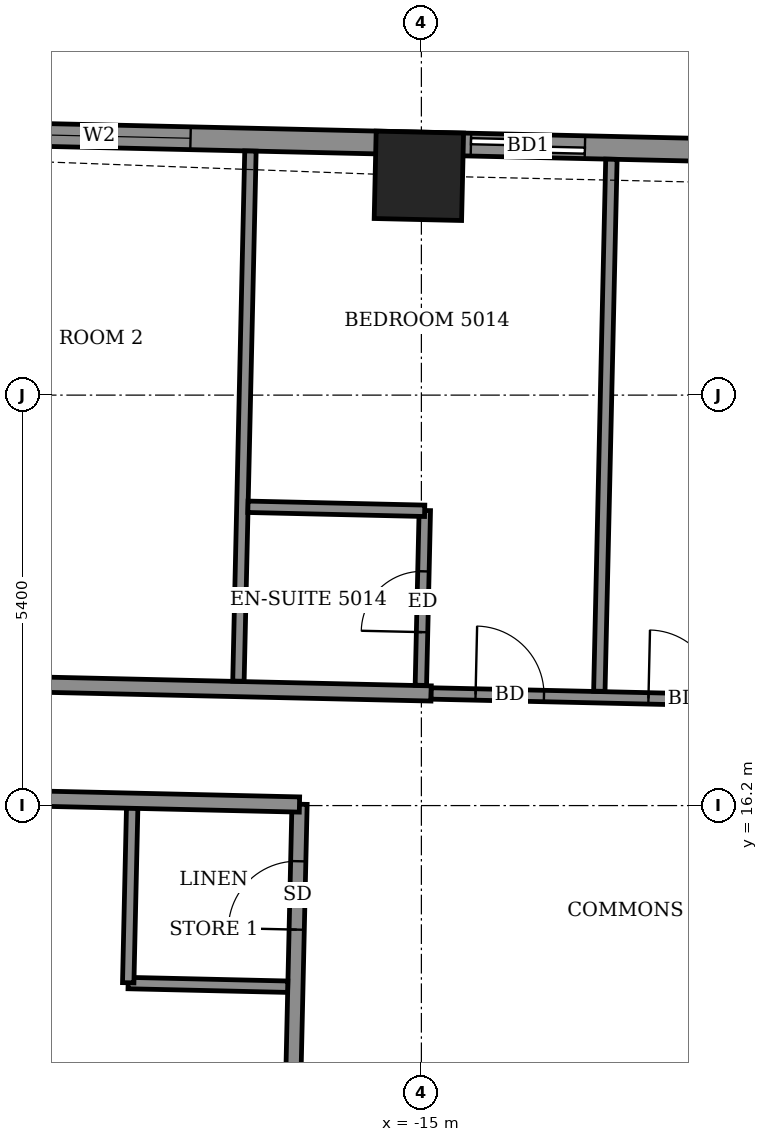
"""IFC4 building model, lengths in metres.
Left out: names, types, materials, properties, quantities, classifications, styles, units other than length and angle.
Written with IfcOpenShell. Run it as: python <this file> out.ifc"""

import sys

from ifc_helpers import new_model, si_unit, direction, frame, frame_2d, origin, origin_2d, place, context, subcontext, project, spatial, rectangle, extrude, element, fill, save


model = new_model("IFC4")
c1 = context("Model", 3, precision=1e-05, world=origin(), true_north=direction((0.0, 1.0)))
c2 = subcontext(c1, "Body", "Model", "MODEL_VIEW")
j1 = project(units=[si_unit("LENGTHUNIT", "METRE"), si_unit("PLANEANGLEUNIT", "RADIAN")], contexts=[c1])
p1 = place(None, origin())
s1 = spatial("IfcSite", under=j1, at=p1, CompositionType="ELEMENT")
p2 = place(p1, origin())
s2 = spatial("IfcBuilding", under=s1, at=p2, CompositionType="ELEMENT")
p3 = place(p2, frame((0.0, 0.0, 197.9)))
s3 = spatial("IfcBuildingStorey", under=s2, at=p3, CompositionType="ELEMENT", Elevation=197.9)
p4 = place(p3, frame((-15.033, 24.485, -0.55), z_axis=(0.0, 0.0, 1.0), x_axis=(-0.999742993665, 0.022670390785, 0.0)))
e1 = element("IfcColumn", 1, at=p4, inside=s3, PredefinedType="COLUMN", context=c2, shape_type="SweptSolid", body=[
    extrude(rectangle(XDim=1.15, YDim=1.15, at=origin_2d()), origin(), (0.0, 0.0, 1.0), 3.6),
])
p5 = place(p3, frame((20.437, 24.106, 0.0), z_axis=(0.0, 0.0, 1.0), x_axis=(-0.999742506232, 0.022691875925, 0.0)))
e2 = element("IfcWall", 2, at=p5, inside=s3, PredefinedType="SOLIDWALL", context=c2, shape_type="SweptSolid", body=[
    extrude(rectangle(XDim=42.444, YDim=0.3, at=frame_2d((21.222, 0.0))), origin(), (0.0, 0.0, 1.0), 3.05),
])
p6 = place(p5, frame((2.287, 0.0, 0.0)))
e3 = element("IfcOpeningElement", 3, at=p6, cuts=e2, PredefinedType="OPENING", context=c2, shape_type="SweptSolid", body=[
    extrude(rectangle(XDim=1.5, YDim=2.4, at=frame_2d((0.75, 1.2))), frame((0.0, 0.16, 0.0), z_axis=(0.0, -1.0, 0.0), x_axis=(1.0, 0.0, 0.0)), (0.0, 0.0, 1.0), 0.32),
])
p7 = place(p5, frame((7.947, 0.0, 0.0)))
e4 = element("IfcOpeningElement", 4, at=p7, cuts=e2, PredefinedType="OPENING", context=c2, shape_type="SweptSolid", body=[
    extrude(rectangle(XDim=1.5, YDim=2.4, at=frame_2d((0.75, 1.2))), frame((0.0, 0.16, 0.0), z_axis=(0.0, -1.0, 0.0), x_axis=(1.0, 0.0, 0.0)), (0.0, 0.0, 1.0), 0.32),
])
p8 = place(p5, frame((11.184, 0.0, 0.0)))
e5 = element("IfcOpeningElement", 5, at=p8, cuts=e2, PredefinedType="OPENING", context=c2, shape_type="SweptSolid", body=[
    extrude(rectangle(XDim=1.5, YDim=2.4, at=frame_2d((0.75, 1.2))), frame((0.0, 0.16, 0.0), z_axis=(0.0, -1.0, 0.0), x_axis=(1.0, 0.0, 0.0)), (0.0, 0.0, 1.0), 0.32),
])
p9 = place(p5, frame((16.469, 0.0, 0.0)))
e6 = element("IfcOpeningElement", 6, at=p9, cuts=e2, PredefinedType="OPENING", context=c2, shape_type="SweptSolid", body=[
    extrude(rectangle(XDim=1.5, YDim=2.4, at=frame_2d((0.75, 1.2))), frame((0.0, 0.16, 0.0), z_axis=(0.0, -1.0, 0.0), x_axis=(1.0, 0.0, 0.0)), (0.0, 0.0, 1.0), 0.32),
])
p10 = place(p5, frame((22.02, 0.0, 0.0)))
e7 = element("IfcOpeningElement", 7, at=p10, cuts=e2, PredefinedType="OPENING", context=c2, shape_type="SweptSolid", body=[
    extrude(rectangle(XDim=1.5, YDim=2.4, at=frame_2d((0.75, 1.2))), frame((0.0, 0.16, 0.0), z_axis=(0.0, -1.0, 0.0), x_axis=(1.0, 0.0, 0.0)), (0.0, 0.0, 1.0), 0.32),
])
p11 = place(p5, frame((25.257, 0.0, 0.0)))
e8 = element("IfcOpeningElement", 8, at=p11, cuts=e2, PredefinedType="OPENING", context=c2, shape_type="SweptSolid", body=[
    extrude(rectangle(XDim=1.5, YDim=2.4, at=frame_2d((0.75, 1.2))), frame((0.0, 0.16, 0.0), z_axis=(0.0, -1.0, 0.0), x_axis=(1.0, 0.0, 0.0)), (0.0, 0.0, 1.0), 0.32),
])
p12 = place(p5, frame((30.057, 0.0, 0.0)))
e9 = element("IfcOpeningElement", 9, at=p12, cuts=e2, PredefinedType="OPENING", context=c2, shape_type="SweptSolid", body=[
    extrude(rectangle(XDim=1.5, YDim=2.4, at=frame_2d((0.75, 1.2))), frame((0.0, 0.16, 0.0), z_axis=(0.0, -1.0, 0.0), x_axis=(1.0, 0.0, 0.0)), (0.0, 0.0, 1.0), 0.32),
])
p13 = place(p5, frame((33.294, 0.0, 0.0)))
e10 = element("IfcOpeningElement", 10, at=p13, cuts=e2, PredefinedType="OPENING", context=c2, shape_type="SweptSolid", body=[
    extrude(rectangle(XDim=1.5, YDim=2.4, at=frame_2d((0.75, 1.2))), frame((0.0, 0.16, 0.0), z_axis=(0.0, -1.0, 0.0), x_axis=(1.0, 0.0, 0.0)), (0.0, 0.0, 1.0), 0.32),
])
p14 = place(p5, frame((38.484, 0.0, 0.9)))
e11 = element("IfcOpeningElement", 11, at=p14, cuts=e2, PredefinedType="OPENING", context=c2, shape_type="SweptSolid", body=[
    extrude(rectangle(XDim=2.4, YDim=1.5, at=frame_2d((1.2, 0.75))), frame((0.0, 0.16, 0.0), z_axis=(0.0, -1.0, 0.0), x_axis=(1.0, 0.0, 0.0)), (0.0, 0.0, 1.0), 0.32),
])
p15 = place(p3, frame((-17.247, -12.149, 0.0), z_axis=(0.0, 0.0, 1.0), x_axis=(0.022698146637, 0.999742363881, 0.0)))
e12 = element("IfcWall", 12, at=p15, inside=s3, PredefinedType="PARTITIONING", context=c2, shape_type="SweptSolid", body=[
    extrude(rectangle(XDim=28.374, YDim=0.2, at=frame_2d((14.187, 0.0))), origin(), (0.0, 0.0, 1.0), 3.05),
])
p16 = place(p15, frame((23.0, 0.0, 0.0)))
e13 = element("IfcOpeningElement", 13, at=p16, cuts=e12, PredefinedType="OPENING", context=c2, shape_type="SweptSolid", body=[
    extrude(rectangle(XDim=1.0, YDim=2.1, at=frame_2d((0.5, 1.05))), frame((0.0, 0.11, 0.0), z_axis=(0.0, -1.0, 0.0), x_axis=(1.0, 0.0, 0.0)), (0.0, 0.0, 1.0), 0.22),
])
p17 = place(p15, frame((26.724, 0.0, 0.0)))
e14 = element("IfcOpeningElement", 14, at=p17, cuts=e12, PredefinedType="OPENING", context=c2, shape_type="SweptSolid", body=[
    extrude(rectangle(XDim=0.9, YDim=2.1, at=frame_2d((0.45, 1.05))), frame((0.0, 0.11, 0.0), z_axis=(0.0, -1.0, 0.0), x_axis=(1.0, 0.0, 0.0)), (0.0, 0.0, 1.0), 0.22),
])
p18 = place(p15, frame((17.025, 0.0, 0.0)))
e15 = element("IfcOpeningElement", 15, at=p18, cuts=e12, PredefinedType="OPENING", context=c2, shape_type="SweptSolid", body=[
    extrude(rectangle(XDim=1.0, YDim=2.1, at=frame_2d((0.5, 1.05))), frame((0.0, 0.11, 0.0), z_axis=(0.0, -1.0, 0.0), x_axis=(1.0, 0.0, 0.0)), (0.0, 0.0, 1.0), 0.22),
])
p19 = place(p15, frame((19.275, 0.0, 0.0)))
e16 = element("IfcOpeningElement", 16, at=p19, cuts=e12, PredefinedType="OPENING", context=c2, shape_type="SweptSolid", body=[
    extrude(rectangle(XDim=0.9, YDim=2.1, at=frame_2d((0.45, 1.05))), frame((0.0, 0.11, 0.0), z_axis=(0.0, -1.0, 0.0), x_axis=(1.0, 0.0, 0.0)), (0.0, 0.0, 1.0), 0.22),
])
p20 = place(p15, frame((14.95, 0.0, 0.0)))
e17 = element("IfcOpeningElement", 17, at=p20, cuts=e12, PredefinedType="OPENING", context=c2, shape_type="SweptSolid", body=[
    extrude(rectangle(XDim=1.0, YDim=2.1, at=frame_2d((0.5, 1.05))), frame((0.0, 0.11, 0.0), z_axis=(0.0, -1.0, 0.0), x_axis=(1.0, 0.0, 0.0)), (0.0, 0.0, 1.0), 0.22),
])
p21 = place(p15, frame((12.625, 0.0, 0.0)))
e18 = element("IfcOpeningElement", 18, at=p21, cuts=e12, PredefinedType="OPENING", context=c2, shape_type="SweptSolid", body=[
    extrude(rectangle(XDim=0.9, YDim=2.1, at=frame_2d((0.45, 1.05))), frame((0.0, 0.11, 0.0), z_axis=(0.0, -1.0, 0.0), x_axis=(1.0, 0.0, 0.0)), (0.0, 0.0, 1.0), 0.22),
])
p22 = place(p15, frame((10.275, 0.0, 0.0)))
e19 = element("IfcOpeningElement", 19, at=p22, cuts=e12, PredefinedType="OPENING", context=c2, shape_type="SweptSolid", body=[
    extrude(rectangle(XDim=1.0, YDim=2.1, at=frame_2d((0.5, 1.05))), frame((0.0, 0.11, 0.0), z_axis=(0.0, -1.0, 0.0), x_axis=(1.0, 0.0, 0.0)), (0.0, 0.0, 1.0), 0.22),
])
p23 = place(p15, frame((8.025, 0.0, 0.0)))
e20 = element("IfcOpeningElement", 20, at=p23, cuts=e12, PredefinedType="OPENING", context=c2, shape_type="SweptSolid", body=[
    extrude(rectangle(XDim=0.9, YDim=2.1, at=frame_2d((0.45, 1.05))), frame((0.0, 0.11, 0.0), z_axis=(0.0, -1.0, 0.0), x_axis=(1.0, 0.0, 0.0)), (0.0, 0.0, 1.0), 0.22),
])
p24 = place(p15, frame((4.337, 0.0, 0.0)))
e21 = element("IfcOpeningElement", 21, at=p24, cuts=e12, PredefinedType="OPENING", context=c2, shape_type="SweptSolid", body=[
    extrude(rectangle(XDim=1.0, YDim=2.1, at=frame_2d((0.5, 1.05))), frame((0.0, 0.11, 0.0), z_axis=(0.0, -1.0, 0.0), x_axis=(1.0, 0.0, 0.0)), (0.0, 0.0, 1.0), 0.22),
])
p25 = place(p15, frame((0.75, 0.0, 0.0)))
e22 = element("IfcOpeningElement", 22, at=p25, cuts=e12, PredefinedType="OPENING", context=c2, shape_type="SweptSolid", body=[
    extrude(rectangle(XDim=0.9, YDim=2.1, at=frame_2d((0.45, 1.05))), frame((0.0, 0.11, 0.0), z_axis=(0.0, -1.0, 0.0), x_axis=(1.0, 0.0, 0.0)), (0.0, 0.0, 1.0), 0.22),
])
p26 = place(p3, frame((-18.858, 13.865, 0.0), z_axis=(0.0, 0.0, 1.0), x_axis=(0.999737555419, -0.022908956429, 0.0)))
e23 = element("IfcWall", 23, at=p26, inside=s3, PredefinedType="PARTITIONING", context=c2, shape_type="SweptSolid", body=[
    extrude(rectangle(XDim=2.099, YDim=0.15, at=frame_2d((1.05, 0.0))), origin(), (0.0, 0.0, 1.0), 3.05),
])
p27 = place(p3, frame((-18.857, 13.869, 0.0), z_axis=(0.0, 0.0, 1.0), x_axis=(0.022612884682, 0.999744296031, 0.0)))
e24 = element("IfcWall", 24, at=p27, inside=s3, PredefinedType="PARTITIONING", context=c2, shape_type="SweptSolid", body=[
    extrude(rectangle(XDim=2.3, YDim=0.15, at=frame_2d((1.15, 0.0))), origin(), (0.0, 0.0, 1.0), 3.05),
])
p28 = place(p3, frame((-25.743, 16.422, 0.0), z_axis=(0.0, 0.0, 1.0), x_axis=(0.999741076645, -0.022754772455, 0.0)))
e25 = element("IfcWall", 25, at=p28, inside=s3, PredefinedType="PARTITIONING", context=c2, shape_type="SweptSolid", body=[
    extrude(rectangle(XDim=9.141, YDim=0.2, at=frame_2d((4.571, 0.0))), origin(), (0.0, 0.0, 1.0), 3.05),
])
p29 = place(p3, frame((-25.709, 17.921, 0.0), z_axis=(0.0, 0.0, 1.0), x_axis=(0.999742764922, -0.022680475901, 0.0)))
e26 = element("IfcWall", 26, at=p29, inside=s3, PredefinedType="PARTITIONING", context=c2, shape_type="SweptSolid", body=[
    extrude(rectangle(XDim=10.84, YDim=0.2, at=frame_2d((5.42, 0.0))), origin(), (0.0, 0.0, 1.0), 3.05),
])
p30 = place(p29, frame((3.893, 0.0, 0.0)))
e27 = element("IfcOpeningElement", 27, at=p30, cuts=e26, PredefinedType="OPENING", context=c2, shape_type="SweptSolid", body=[
    extrude(rectangle(XDim=1.0, YDim=2.1, at=frame_2d((0.5, 1.05))), frame((0.0, 0.11, 0.0), z_axis=(0.0, -1.0, 0.0), x_axis=(1.0, 0.0, 0.0)), (0.0, 0.0, 1.0), 0.22),
])
p31 = place(p3, frame((-14.871, 17.675, 0.0), z_axis=(0.0, 0.0, 1.0), x_axis=(0.999742359486, -0.02269834024, 0.0)))
e28 = element("IfcWall", 28, at=p31, inside=s3, PredefinedType="PARTITIONING", context=c2, shape_type="SweptSolid", body=[
    extrude(rectangle(XDim=30.536, YDim=0.15, at=frame_2d((15.268, 0.0))), origin(), (0.0, 0.0, 1.0), 3.05),
])
p32 = place(p31, frame((28.159, 0.0, 0.0)))
e29 = element("IfcOpeningElement", 29, at=p32, cuts=e28, PredefinedType="OPENING", context=c2, shape_type="SweptSolid", body=[
    extrude(rectangle(XDim=0.9, YDim=2.1, at=frame_2d((0.45, 1.05))), frame((0.0, 0.085, 0.0), z_axis=(0.0, -1.0, 0.0), x_axis=(1.0, 0.0, 0.0)), (0.0, 0.0, 1.0), 0.17),
])
p33 = place(p31, frame((21.034, 0.0, 0.0)))
e30 = element("IfcOpeningElement", 30, at=p33, cuts=e28, PredefinedType="OPENING", context=c2, shape_type="SweptSolid", body=[
    extrude(rectangle(XDim=0.9, YDim=2.1, at=frame_2d((0.45, 1.05))), frame((0.0, 0.085, 0.0), z_axis=(0.0, -1.0, 0.0), x_axis=(1.0, 0.0, 0.0)), (0.0, 0.0, 1.0), 0.17),
])
p34 = place(p31, frame((18.684, 0.0, 0.0)))
e31 = element("IfcOpeningElement", 31, at=p34, cuts=e28, PredefinedType="OPENING", context=c2, shape_type="SweptSolid", body=[
    extrude(rectangle(XDim=0.9, YDim=2.1, at=frame_2d((0.45, 1.05))), frame((0.0, 0.085, 0.0), z_axis=(0.0, -1.0, 0.0), x_axis=(1.0, 0.0, 0.0)), (0.0, 0.0, 1.0), 0.17),
])
p35 = place(p31, frame((11.709, 0.0, 0.0)))
e32 = element("IfcOpeningElement", 32, at=p35, cuts=e28, PredefinedType="OPENING", context=c2, shape_type="SweptSolid", body=[
    extrude(rectangle(XDim=0.9, YDim=2.1, at=frame_2d((0.45, 1.05))), frame((0.0, 0.085, 0.0), z_axis=(0.0, -1.0, 0.0), x_axis=(1.0, 0.0, 0.0)), (0.0, 0.0, 1.0), 0.17),
])
p36 = place(p31, frame((9.734, 0.0, 0.0)))
e33 = element("IfcOpeningElement", 33, at=p36, cuts=e28, PredefinedType="OPENING", context=c2, shape_type="SweptSolid", body=[
    extrude(rectangle(XDim=0.9, YDim=2.1, at=frame_2d((0.45, 1.05))), frame((0.0, 0.085, 0.0), z_axis=(0.0, -1.0, 0.0), x_axis=(1.0, 0.0, 0.0)), (0.0, 0.0, 1.0), 0.17),
])
p37 = place(p31, frame((2.859, 0.0, 0.0)))
e34 = element("IfcOpeningElement", 34, at=p37, cuts=e28, PredefinedType="OPENING", context=c2, shape_type="SweptSolid", body=[
    extrude(rectangle(XDim=0.9, YDim=2.1, at=frame_2d((0.45, 1.05))), frame((0.0, 0.085, 0.0), z_axis=(0.0, -1.0, 0.0), x_axis=(1.0, 0.0, 0.0)), (0.0, 0.0, 1.0), 0.17),
])
p38 = place(p31, frame((0.584, 0.0, 0.0)))
e35 = element("IfcOpeningElement", 35, at=p38, cuts=e28, PredefinedType="OPENING", context=c2, shape_type="SweptSolid", body=[
    extrude(rectangle(XDim=0.9, YDim=2.1, at=frame_2d((0.45, 1.05))), frame((0.0, 0.085, 0.0), z_axis=(0.0, -1.0, 0.0), x_axis=(1.0, 0.0, 0.0)), (0.0, 0.0, 1.0), 0.17),
])
p39 = place(p3, frame((-17.407, 17.837, 0.0), z_axis=(0.0, 0.0, 1.0), x_axis=(0.022643496158, 0.999743603171, 0.0)))
e36 = element("IfcWall", 36, at=p39, inside=s3, PredefinedType="PARTITIONING", context=c2, shape_type="SweptSolid", body=[
    extrude(rectangle(XDim=6.976, YDim=0.15, at=frame_2d((3.488, 0.0))), origin(), (0.0, 0.0, 1.0), 2.55),
])
p40 = place(p3, frame((-15.007, 17.782, 0.0), z_axis=(0.0, 0.0, 1.0), x_axis=(0.022603288534, 0.999744513037, 0.0)))
e37 = element("IfcWall", 37, at=p40, inside=s3, PredefinedType="PARTITIONING", context=c2, shape_type="SweptSolid", body=[
    extrude(rectangle(XDim=2.301, YDim=0.15, at=frame_2d((1.15, 0.0))), origin(), (0.0, 0.0, 1.0), 3.05),
])
p41 = place(p40, frame((0.7, 0.0, 0.0)))
e38 = element("IfcOpeningElement", 38, at=p41, cuts=e37, PredefinedType="OPENING", context=c2, shape_type="SweptSolid", body=[
    extrude(rectangle(XDim=0.8, YDim=2.1, at=frame_2d((0.4, 1.05))), frame((0.0, 0.085, 0.0), z_axis=(0.0, -1.0, 0.0), x_axis=(1.0, 0.0, 0.0)), (0.0, 0.0, 1.0), 0.17),
])
p42 = place(p3, frame((-12.659, 17.704, 0.0), z_axis=(0.0, 0.0, 1.0), x_axis=(0.022703185001, 0.999742249478, 0.0)))
e39 = element("IfcWall", 39, at=p42, inside=s3, PredefinedType="PARTITIONING", context=c2, shape_type="SweptSolid", body=[
    extrude(rectangle(XDim=7.0, YDim=0.15, at=frame_2d((3.5, 0.0))), origin(), (0.0, 0.0, 1.0), 2.55),
])
p43 = place(p3, frame((-17.282, 20.131, 0.0), z_axis=(0.0, 0.0, 1.0), x_axis=(0.999738082346, -0.022885950011, 0.0)))
e40 = element("IfcWall", 40, at=p43, inside=s3, PredefinedType="PARTITIONING", context=c2, shape_type="SweptSolid", body=[
    extrude(rectangle(XDim=2.325, YDim=0.15, at=frame_2d((1.163, 0.0))), origin(), (0.0, 0.0, 1.0), 3.05),
])
p44 = place(p13, origin())
e41 = element("IfcDoor", 41, at=p44, inside=s3, OperationType="SLIDING_TO_LEFT", PredefinedType="DOOR", context=c2, shape_type="SweptSolid", body=[
    extrude(rectangle(XDim=1.5, YDim=2.4, at=frame_2d((0.75, 1.2))), frame((0.0, 0.025, 0.0), z_axis=(0.0, -1.0, 0.0), x_axis=(1.0, 0.0, 0.0)), (0.0, 0.0, 1.0), 0.05),
])
fill(e10, e41)
p45 = place(p14, origin())
e42 = element("IfcWindow", 42, at=p45, inside=s3, PartitioningType="DOUBLE_PANEL_VERTICAL", PredefinedType="WINDOW", context=c2, shape_type="SweptSolid", body=[
    extrude(rectangle(XDim=2.4, YDim=1.5, at=frame_2d((1.2, 0.75))), frame((0.0, 0.03, 0.0), z_axis=(0.0, -1.0, 0.0), x_axis=(1.0, 0.0, 0.0)), (0.0, 0.0, 1.0), 0.06),
])
fill(e11, e42)
p46 = place(p37, origin())
e43 = element("IfcDoor", 43, at=p46, inside=s3, OperationType="SINGLE_SWING_LEFT", PredefinedType="DOOR", context=c2, shape_type="SweptSolid", body=[
    extrude(rectangle(XDim=0.9, YDim=2.1, at=frame_2d((0.45, 1.05))), frame((0.0, 0.025, 0.0), z_axis=(0.0, -1.0, 0.0), x_axis=(1.0, 0.0, 0.0)), (0.0, 0.0, 1.0), 0.05),
])
fill(e34, e43)
p47 = place(p38, origin())
e44 = element("IfcDoor", 44, at=p47, inside=s3, OperationType="SINGLE_SWING_RIGHT", PredefinedType="DOOR", context=c2, shape_type="SweptSolid", body=[
    extrude(rectangle(XDim=0.9, YDim=2.1, at=frame_2d((0.45, 1.05))), frame((0.0, 0.025, 0.0), z_axis=(0.0, -1.0, 0.0), x_axis=(1.0, 0.0, 0.0)), (0.0, 0.0, 1.0), 0.05),
])
fill(e35, e44)
p48 = place(p41, origin())
e45 = element("IfcDoor", 45, at=p48, inside=s3, OperationType="SINGLE_SWING_RIGHT", PredefinedType="DOOR", context=c2, shape_type="SweptSolid", body=[
    extrude(rectangle(XDim=0.8, YDim=2.1, at=frame_2d((0.4, 1.05))), frame((0.0, 0.025, 0.0), z_axis=(0.0, -1.0, 0.0), x_axis=(1.0, 0.0, 0.0)), (0.0, 0.0, 1.0), 0.05),
])
fill(e38, e45)
p49 = place(p17, origin())
e46 = element("IfcDoor", 46, at=p49, inside=s3, OperationType="SINGLE_SWING_RIGHT", PredefinedType="DOOR", context=c2, shape_type="SweptSolid", body=[
    extrude(rectangle(XDim=0.9, YDim=2.1, at=frame_2d((0.45, 1.05))), frame((0.0, 0.025, 0.0), z_axis=(0.0, -1.0, 0.0), x_axis=(1.0, 0.0, 0.0)), (0.0, 0.0, 1.0), 0.05),
])
fill(e14, e46)
save(model, sys.argv[1])
